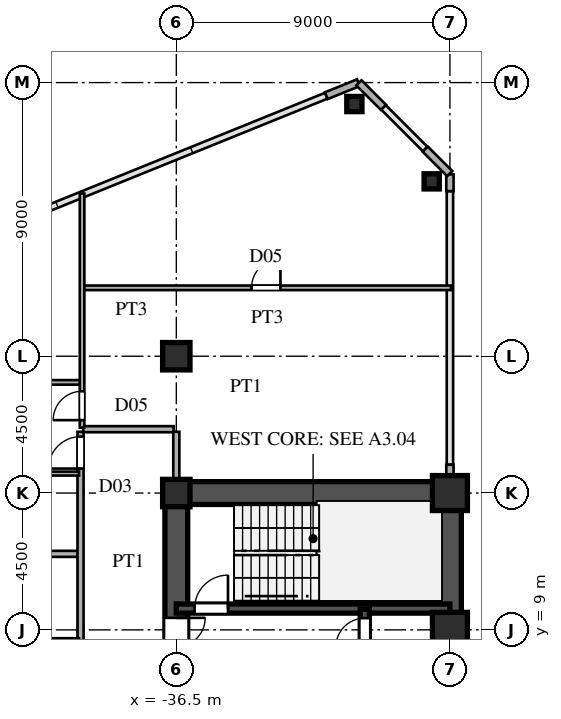
"""IFC4 building model, lengths in metres.
Left out: names, types, materials, properties, quantities, classifications, styles, units other than length and angle.
Written with IfcOpenShell. Run it as: python <this file> out.ifc"""

import sys

from ifc_helpers import new_model, si_unit, direction, frame, frame_2d, origin, origin_2d, place, context, subcontext, project, spatial, rectangle, hollow_rectangle, i_section, extrude, source, transform, mapped, element, fill, save


model = new_model("IFC4")
c1 = context("Model", 3, precision=1e-05, world=origin(), true_north=direction((0.0, 1.0)))
c2 = subcontext(c1, "Body", "Model", "MODEL_VIEW")
j1 = project(units=[si_unit("LENGTHUNIT", "METRE"), si_unit("PLANEANGLEUNIT", "RADIAN")], contexts=[c1])
p1 = place(None, origin())
s1 = spatial("IfcSite", under=j1, at=p1, CompositionType="ELEMENT")
p2 = place(p1, origin())
s2 = spatial("IfcBuilding", under=s1, at=p2, CompositionType="ELEMENT")
p3 = place(p2, frame((0.0, 0.0, 33.3)))
s3 = spatial("IfcBuildingStorey", under=s2, at=p3, CompositionType="ELEMENT", Elevation=33.3)
m1 = source(origin(), c2, "Body", "SweptSolid", [
    extrude(hollow_rectangle(XDim=1.15, YDim=1.15, WallThickness=0.048, at=origin_2d()), origin(), (0.0, 0.0, 1.0), 3.6),
])
for number, where, z_axis, x_axis in (
    (1, (-27.5, 9.0, 0.0), (0.0, 0.0, 1.0), (1.0, 0.0, 0.0)),
    (2, (-27.5, 13.5, 0.0), (0.0, 0.0, 1.0), (1.0, 0.0, 0.0)),
):
    element("IfcColumn", number, at=place(p3, frame(where, z_axis=z_axis, x_axis=x_axis)), inside=s3, PredefinedType="COLUMN", context=c2, shape_type="MappedRepresentation", body=[
        mapped(m1, transform((0.0, 0.0, 0.0), scale=1.0)),
    ])
m2 = source(origin(), c2, "Body", "SweptSolid", [
    extrude(i_section(OverallWidth=0.9, OverallDepth=0.9, WebThickness=0.036, FlangeThickness=0.055, at=origin_2d()), origin(), (0.0, 0.0, 1.0), 3.6),
])
for number, where, z_axis, x_axis in (
    (3, (-36.5, 13.5, 0.0), (0.0, 0.0, 1.0), (1.0, 0.0, 0.0)),
    (4, (-36.5, 18.0, 0.0), (0.0, 0.0, 1.0), (1.0, 0.0, 0.0)),
):
    element("IfcColumn", number, at=place(p3, frame(where, z_axis=z_axis, x_axis=x_axis)), inside=s3, PredefinedType="COLUMN", context=c2, shape_type="MappedRepresentation", body=[
        mapped(m2, transform((0.0, 0.0, 0.0), scale=1.0)),
    ])
m3 = source(origin(), c2, "Body", "SweptSolid", [
    extrude(hollow_rectangle(XDim=0.5, YDim=0.5, WallThickness=0.02, at=origin_2d()), origin(), (0.0, 0.0, 1.0), 3.6),
])
for number, where, z_axis, x_axis in (
    (5, (-28.1, 23.751, 0.0), (0.0, 0.0, 1.0), (1.0, 0.0, 0.0)),
    (6, (-30.643, 26.295, 0.0), (0.0, 0.0, 1.0), (1.0, 0.0, 0.0)),
):
    element("IfcColumn", number, at=place(p3, frame(where, z_axis=z_axis, x_axis=x_axis)), inside=s3, PredefinedType="COLUMN", context=c2, shape_type="MappedRepresentation", body=[
        mapped(m3, transform((0.0, 0.0, 0.0), scale=1.0)),
    ])
p4 = place(p3, frame((-27.5, 13.88, 0.0), z_axis=(0.0, 0.0, 1.0), x_axis=(0.0, 1.0, 0.0)))
e7 = element("IfcWall", 7, at=p4, inside=s3, PredefinedType="SOLIDWALL", context=c2, shape_type="SweptSolid", body=[
    extrude(rectangle(XDim=0.55, YDim=0.24, at=frame_2d((0.275, 0.0))), origin(), (0.0, 0.0, 1.0), 2.88),
])
p5 = place(p3, frame((-27.5, 23.43, 0.0), z_axis=(0.0, 0.0, 1.0), x_axis=(0.0, 1.0, 0.0)))
e8 = element("IfcWall", 8, at=p5, inside=s3, PredefinedType="SOLIDWALL", context=c2, shape_type="SweptSolid", body=[
    extrude(rectangle(XDim=0.55, YDim=0.24, at=frame_2d((0.275, 0.0))), origin(), (0.0, 0.0, 1.0), 3.38),
])
for number, where, z_axis, x_axis in (
    (9, (-27.507, 24.007, 0.0), (0.0, 0.0, 1.0), (-0.707, 0.707, 0.0)),
    (10, (-29.687, 26.187, 0.0), (0.0, 0.0, 1.0), (-0.707, 0.707, 0.0)),
):
    element("IfcWall", number, at=place(p3, frame(where, z_axis=z_axis, x_axis=x_axis)), inside=s3, PredefinedType="SOLIDWALL", context=c2, shape_type="SweptSolid", body=[
        extrude(rectangle(XDim=1.14, YDim=0.24, at=frame_2d((0.57, 0.0))), origin(), (0.0, 0.0, 1.0), 3.38),
    ])
p6 = place(p3, frame((-30.509, 26.996, 0.0), z_axis=(0.0, 0.0, 1.0), x_axis=(-0.927007103665, -0.375043770452, 0.0)))
e11 = element("IfcWall", 11, at=p6, inside=s3, PredefinedType="SOLIDWALL", context=c2, shape_type="SweptSolid", body=[
    extrude(rectangle(XDim=1.14, YDim=0.24, at=frame_2d((0.57, 0.0))), origin(), (0.0, 0.0, 1.0), 3.38),
])
p7 = place(p3, frame((-27.5, 1.3, 0.0), z_axis=(0.0, 0.0, 1.0), x_axis=(0.0, 1.0, 0.0)))
e12 = element("IfcWall", 12, at=p7, inside=s3, PredefinedType="SHEAR", context=c2, shape_type="SweptSolid", body=[
    extrude(rectangle(XDim=12.2, YDim=0.75, at=frame_2d((6.1, 0.0))), origin(), (0.0, 0.0, 1.0), 3.38),
])
p8 = place(p3, frame((-36.5, 13.5, 0.0), z_axis=(0.0, 0.0, 1.0), x_axis=(1.0, 0.0, 0.0)))
e13 = element("IfcWall", 13, at=p8, inside=s3, PredefinedType="SHEAR", context=c2, shape_type="SweptSolid", body=[
    extrude(rectangle(XDim=9.0, YDim=0.75, at=frame_2d((4.5, 0.0))), origin(), (0.0, 0.0, 1.0), 3.38),
])
p9 = place(p3, frame((-36.5, 8.2, 0.0), z_axis=(0.0, 0.0, 1.0), x_axis=(0.0, 1.0, 0.0)))
e14 = element("IfcWall", 14, at=p9, inside=s3, PredefinedType="SHEAR", context=c2, shape_type="SweptSolid", body=[
    extrude(rectangle(XDim=5.45, YDim=0.75, at=frame_2d((2.725, 0.0))), origin(), (0.0, 0.0, 1.0), 3.38),
])
p10 = place(p9, frame((0.245, 0.0, 0.0)))
e15 = element("IfcOpeningElement", 15, at=p10, cuts=e14, PredefinedType="OPENING", context=c2, shape_type="SweptSolid", body=[
    extrude(rectangle(XDim=0.95, YDim=2.15, at=frame_2d((0.475, 1.075))), frame((0.0, 0.385, 0.0), z_axis=(0.0, -1.0, 0.0), x_axis=(1.0, 0.0, 0.0)), (0.0, 0.0, 1.0), 0.77),
])
p11 = place(p3, frame((-36.5, 9.7, 0.0), z_axis=(0.0, 0.0, 1.0), x_axis=(1.0, 0.0, 0.0)))
e16 = element("IfcWall", 16, at=p11, inside=s3, PredefinedType="SHEAR", context=c2, shape_type="SweptSolid", body=[
    extrude(rectangle(XDim=9.0, YDim=0.3, at=frame_2d((4.5, 0.0))), origin(), (0.0, 0.0, 1.0), 3.38),
])
p12 = place(p11, frame((0.6, 0.0, 0.0)))
e17 = element("IfcOpeningElement", 17, at=p12, cuts=e16, PredefinedType="OPENING", context=c2, shape_type="SweptSolid", body=[
    extrude(rectangle(XDim=1.1, YDim=2.2, at=frame_2d((0.55, 1.1))), frame((0.0, 0.16, 0.0), z_axis=(0.0, -1.0, 0.0), x_axis=(1.0, 0.0, 0.0)), (0.0, 0.0, 1.0), 0.32),
])
p13 = place(p3, frame((-30.3, 8.15, 0.0), z_axis=(0.0, 0.0, 1.0), x_axis=(0.0, 1.0, 0.0)))
e18 = element("IfcWall", 18, at=p13, inside=s3, PredefinedType="SHEAR", context=c2, shape_type="SweptSolid", body=[
    extrude(rectangle(XDim=1.53, YDim=0.3, at=frame_2d((0.765, 0.0))), origin(), (0.0, 0.0, 1.0), 3.38),
])
p14 = place(p13, frame((0.285, 0.0, 0.0)))
e19 = element("IfcOpeningElement", 19, at=p14, cuts=e18, PredefinedType="OPENING", context=c2, shape_type="SweptSolid", body=[
    extrude(rectangle(XDim=0.95, YDim=2.15, at=frame_2d((0.475, 1.075))), frame((0.0, 0.16, 0.0), z_axis=(0.0, -1.0, 0.0), x_axis=(1.0, 0.0, 0.0)), (0.0, 0.0, 1.0), 0.32),
])
p15 = place(p3, frame((-44.15, 8.65, 0.0), z_axis=(0.0, 0.0, 1.0), x_axis=(1.0, 0.0, 0.0)))
e20 = element("IfcWall", 20, at=p15, inside=s3, PredefinedType="PARTITIONING", context=c2, shape_type="SweptSolid", body=[
    extrude(rectangle(XDim=4.45, YDim=0.15, at=frame_2d((2.225, 0.0))), origin(), (0.0, 0.0, 1.0), 3.38),
])
p16 = place(p15, frame((1.75, 0.0, 0.0)))
e21 = element("IfcOpeningElement", 21, at=p16, cuts=e20, PredefinedType="OPENING", context=c2, shape_type="SweptSolid", body=[
    extrude(rectangle(XDim=0.95, YDim=2.15, at=frame_2d((0.475, 1.075))), frame((0.0, 0.085, 0.0), z_axis=(0.0, -1.0, 0.0), x_axis=(1.0, 0.0, 0.0)), (0.0, 0.0, 1.0), 0.17),
])
p17 = place(p3, frame((-68.807, 11.5, 0.0), z_axis=(0.0, 0.0, 1.0), x_axis=(1.0, 0.0, 0.0)))
e22 = element("IfcWall", 22, at=p17, inside=s3, PredefinedType="PARTITIONING", context=c2, shape_type="SweptSolid", body=[
    extrude(rectangle(XDim=29.077, YDim=0.2, at=frame_2d((14.539, 0.0))), origin(), (0.0, 0.0, 1.0), 3.38),
])
p18 = place(p3, frame((-44.15, 14.14, 0.0), z_axis=(0.0, 0.0, 1.0), x_axis=(1.0, 0.0, 0.0)))
e23 = element("IfcWall", 23, at=p18, inside=s3, PredefinedType="PARTITIONING", context=c2, shape_type="SweptSolid", body=[
    extrude(rectangle(XDim=4.45, YDim=0.13, at=frame_2d((2.225, 0.0))), origin(), (0.0, 0.0, 1.0), 3.38),
])
p19 = place(p18, frame((1.785, 0.0, 0.0)))
e24 = element("IfcOpeningElement", 24, at=p19, cuts=e23, PredefinedType="OPENING", context=c2, shape_type="SweptSolid", body=[
    extrude(rectangle(XDim=0.88, YDim=2.1, at=frame_2d((0.44, 1.05))), frame((0.0, 0.075, 0.0), z_axis=(0.0, -1.0, 0.0), x_axis=(1.0, 0.0, 0.0)), (0.0, 0.0, 1.0), 0.15),
])
p20 = place(p3, frame((-39.565, 15.6, 0.0), z_axis=(0.0, 0.0, 1.0), x_axis=(1.0, 0.0, 0.0)))
e25 = element("IfcWall", 25, at=p20, inside=s3, PredefinedType="PARTITIONING", context=c2, shape_type="SweptSolid", body=[
    extrude(rectangle(XDim=2.98, YDim=0.2, at=frame_2d((1.49, 0.0))), origin(), (0.0, 0.0, 1.0), 3.38),
])
p21 = place(p3, frame((-44.15, 17.14, 0.0), z_axis=(0.0, 0.0, 1.0), x_axis=(1.0, 0.0, 0.0)))
e26 = element("IfcWall", 26, at=p21, inside=s3, PredefinedType="PARTITIONING", context=c2, shape_type="SweptSolid", body=[
    extrude(rectangle(XDim=4.5, YDim=0.15, at=frame_2d((2.25, 0.0))), origin(), (0.0, 0.0, 1.0), 3.38),
])
p22 = place(p21, frame((1.775, 0.0, 0.0)))
e27 = element("IfcOpeningElement", 27, at=p22, cuts=e26, PredefinedType="OPENING", context=c2, shape_type="SweptSolid", body=[
    extrude(rectangle(XDim=0.95, YDim=2.15, at=frame_2d((0.475, 1.075))), frame((0.0, 0.085, 0.0), z_axis=(0.0, -1.0, 0.0), x_axis=(1.0, 0.0, 0.0)), (0.0, 0.0, 1.0), 0.17),
])
p23 = place(p3, frame((-39.55, 20.25, 0.0), z_axis=(0.0, 0.0, 1.0), x_axis=(1.0, 0.0, 0.0)))
e28 = element("IfcWall", 28, at=p23, inside=s3, PredefinedType="PARTITIONING", context=c2, shape_type="SweptSolid", body=[
    extrude(rectangle(XDim=12.085, YDim=0.15, at=frame_2d((6.042, 0.0))), origin(), (0.0, 0.0, 1.0), 3.38),
])
p24 = place(p23, frame((5.525, 0.0, 0.0)))
e29 = element("IfcOpeningElement", 29, at=p24, cuts=e28, PredefinedType="OPENING", context=c2, shape_type="SweptSolid", body=[
    extrude(rectangle(XDim=0.95, YDim=2.15, at=frame_2d((0.475, 1.075))), frame((0.0, 0.085, 0.0), z_axis=(0.0, -1.0, 0.0), x_axis=(1.0, 0.0, 0.0)), (0.0, 0.0, 1.0), 0.17),
])
p25 = place(p3, frame((-39.65, -15.515, 0.0), z_axis=(0.0, 0.0, 1.0), x_axis=(0.0, 1.0, 0.0)))
e30 = element("IfcWall", 30, at=p25, inside=s3, PredefinedType="PARTITIONING", context=c2, shape_type="SweptSolid", body=[
    extrude(rectangle(XDim=31.03, YDim=0.2, at=frame_2d((15.515, 0.0))), origin(), (0.0, 0.0, 1.0), 3.38),
])
p26 = place(p25, frame((0.16, 0.0, 0.0)))
e31 = element("IfcOpeningElement", 31, at=p26, cuts=e30, PredefinedType="OPENING", context=c2, shape_type="SweptSolid", body=[
    extrude(rectangle(XDim=1.05, YDim=2.25, at=frame_2d((0.525, 1.125))), frame((0.0, 0.11, 0.0), z_axis=(0.0, -1.0, 0.0), x_axis=(1.0, 0.0, 0.0)), (0.0, 0.0, 1.0), 0.22),
])
p27 = place(p25, frame((10.038, 0.0, 0.0)))
e32 = element("IfcOpeningElement", 32, at=p27, cuts=e30, PredefinedType="OPENING", context=c2, shape_type="SweptSolid", body=[
    extrude(rectangle(XDim=1.05, YDim=2.25, at=frame_2d((0.525, 1.125))), frame((0.0, 0.11, 0.0), z_axis=(0.0, -1.0, 0.0), x_axis=(1.0, 0.0, 0.0)), (0.0, 0.0, 1.0), 0.22),
])
p28 = place(p25, frame((21.638, 0.0, 0.0)))
e33 = element("IfcOpeningElement", 33, at=p28, cuts=e30, PredefinedType="OPENING", context=c2, shape_type="SweptSolid", body=[
    extrude(rectangle(XDim=1.05, YDim=2.25, at=frame_2d((0.525, 1.125))), frame((0.0, 0.11, 0.0), z_axis=(0.0, -1.0, 0.0), x_axis=(1.0, 0.0, 0.0)), (0.0, 0.0, 1.0), 0.22),
])
p29 = place(p25, frame((29.82, 0.0, 0.0)))
e34 = element("IfcOpeningElement", 34, at=p29, cuts=e30, PredefinedType="OPENING", context=c2, shape_type="SweptSolid", body=[
    extrude(rectangle(XDim=1.05, YDim=2.25, at=frame_2d((0.525, 1.125))), frame((0.0, 0.11, 0.0), z_axis=(0.0, -1.0, 0.0), x_axis=(1.0, 0.0, 0.0)), (0.0, 0.0, 1.0), 0.22),
])
p30 = place(p3, frame((-39.6, 15.65, 0.0), z_axis=(0.0, 0.0, 1.0), x_axis=(0.0, 1.0, 0.0)))
e35 = element("IfcWall", 35, at=p30, inside=s3, PredefinedType="PARTITIONING", context=c2, shape_type="SweptSolid", body=[
    extrude(rectangle(XDim=7.702, YDim=0.15, at=frame_2d((3.851, 0.0))), origin(), (0.0, 0.0, 1.0), 3.38),
])
p31 = place(p30, frame((0.248, 0.0, 0.0)))
e36 = element("IfcOpeningElement", 36, at=p31, cuts=e35, PredefinedType="OPENING", context=c2, shape_type="SweptSolid", body=[
    extrude(rectangle(XDim=0.95, YDim=2.15, at=frame_2d((0.475, 1.075))), frame((0.0, 0.085, 0.0), z_axis=(0.0, -1.0, 0.0), x_axis=(1.0, 0.0, 0.0)), (0.0, 0.0, 1.0), 0.17),
])
p32 = place(p3, frame((-36.5, 13.88, 0.0), z_axis=(0.0, 0.0, 1.0), x_axis=(0.0, 1.0, 0.0)))
e37 = element("IfcWall", 37, at=p32, inside=s3, PredefinedType="PARTITIONING", context=c2, shape_type="SweptSolid", body=[
    extrude(rectangle(XDim=1.635, YDim=0.2, at=frame_2d((0.817, 0.0))), origin(), (0.0, 0.0, 1.0), 2.68),
])
m4 = source(origin(), c2, "Body", "SweptSolid", [
    extrude(rectangle(XDim=0.95, YDim=2.15, at=frame_2d((0.475, 1.075))), frame((0.0, 0.025, 0.0), z_axis=(0.0, -1.0, 0.0), x_axis=(1.0, 0.0, 0.0)), (0.0, 0.0, 1.0), 0.05),
])
p33 = place(p10, frame((0.95, 0.0, 0.0), z_axis=(0.0, 0.0, 1.0), x_axis=(-1.0, 0.0, 0.0)))
e38 = element("IfcDoor", 38, at=p33, inside=s3, OperationType="SINGLE_SWING_RIGHT", PredefinedType="DOOR", context=c2, shape_type="MappedRepresentation", body=[
    mapped(m4, transform((0.0, 0.0, 0.0), scale=1.0)),
])
fill(e15, e38)
m5 = source(origin(), c2, "Body", "SweptSolid", [
    extrude(rectangle(XDim=1.1, YDim=2.2, at=frame_2d((0.55, 1.1))), frame((0.0, 0.025, 0.0), z_axis=(0.0, -1.0, 0.0), x_axis=(1.0, 0.0, 0.0)), (0.0, 0.0, 1.0), 0.05),
])
p34 = place(p12, origin())
e39 = element("IfcDoor", 39, at=p34, inside=s3, OperationType="SINGLE_SWING_RIGHT", PredefinedType="DOOR", context=c2, shape_type="MappedRepresentation", body=[
    mapped(m5, transform((0.0, 0.0, 0.0), scale=1.0)),
])
fill(e17, e39)
p35 = place(p14, origin())
e40 = element("IfcDoor", 40, at=p35, inside=s3, OperationType="SINGLE_SWING_LEFT", PredefinedType="DOOR", context=c2, shape_type="MappedRepresentation", body=[
    mapped(m4, transform((0.0, 0.0, 0.0), scale=1.0)),
])
fill(e19, e40)
m6 = source(origin(), c2, "Body", "SweptSolid", [
    extrude(rectangle(XDim=0.95, YDim=2.15, at=frame_2d((0.475, 1.075))), frame((0.0, 0.025, 0.0), z_axis=(0.0, -1.0, 0.0), x_axis=(1.0, 0.0, 0.0)), (0.0, 0.0, 1.0), 0.05),
])
p36 = place(p24, origin())
e41 = element("IfcDoor", 41, at=p36, inside=s3, OperationType="SINGLE_SWING_RIGHT", PredefinedType="DOOR", context=c2, shape_type="MappedRepresentation", body=[
    mapped(m6, transform((0.0, 0.0, 0.0), scale=1.0)),
])
fill(e29, e41)
m7 = source(origin(), c2, "Body", "SweptSolid", [
    extrude(rectangle(XDim=1.05, YDim=2.25, at=frame_2d((0.525, 1.125))), frame((0.0, 0.025, 0.0), z_axis=(0.0, -1.0, 0.0), x_axis=(1.0, 0.0, 0.0)), (0.0, 0.0, 1.0), 0.05),
])
p37 = place(p29, origin())
e42 = element("IfcDoor", 42, at=p37, inside=s3, OperationType="SINGLE_SWING_LEFT", PredefinedType="DOOR", context=c2, shape_type="MappedRepresentation", body=[
    mapped(m7, transform((0.0, 0.0, 0.0), scale=1.0)),
])
fill(e34, e42)
p38 = place(p31, origin())
e43 = element("IfcDoor", 43, at=p38, inside=s3, OperationType="SINGLE_SWING_LEFT", PredefinedType="DOOR", context=c2, shape_type="MappedRepresentation", body=[
    mapped(m6, transform((0.0, 0.0, 0.0), scale=1.0)),
])
fill(e36, e43)
save(model, sys.argv[1])
